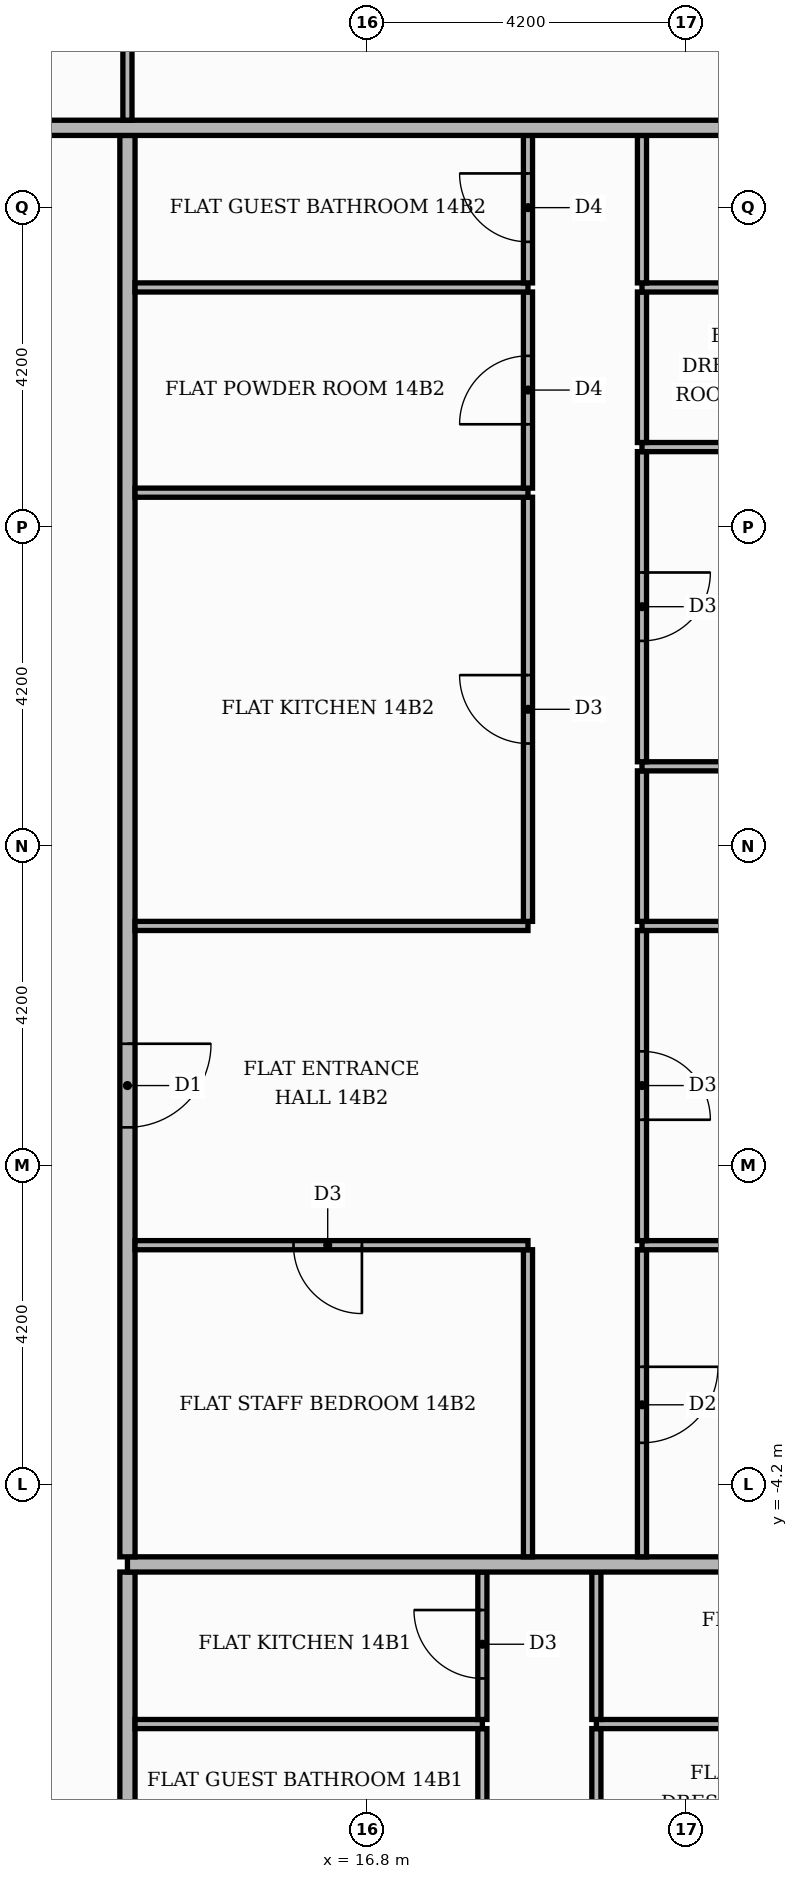
"""IFC4 building model, lengths in metres.
Left out: names, types, materials, properties, quantities, classifications, styles, units other than length and angle.
Written with IfcOpenShell. Run it as: python <this file> out.ifc"""

import sys

from ifc_helpers import new_model, si_unit, direction, frame, frame_2d, origin, place, context, subcontext, project, spatial, rectangle, extrude, element, fill, save


model = new_model("IFC4")
c1 = context("Model", 3, precision=1e-05, world=origin(), true_north=direction((0.0, 1.0)))
c2 = subcontext(c1, "Body", "Model", "MODEL_VIEW")
j1 = project(units=[si_unit("LENGTHUNIT", "METRE"), si_unit("PLANEANGLEUNIT", "RADIAN")], contexts=[c1])
p1 = place(None, origin())
s1 = spatial("IfcSite", under=j1, at=p1, CompositionType="ELEMENT")
p2 = place(p1, origin())
s2 = spatial("IfcBuilding", under=s1, at=p2, CompositionType="ELEMENT")
p3 = place(p2, frame((0.0, 0.0, 62.1)))
s3 = spatial("IfcBuildingStorey", under=s2, at=p3, CompositionType="ELEMENT", Elevation=62.1)
p4 = place(p3, frame((13.65, -13.55, 0.0), z_axis=(0.0, 0.0, 1.0), x_axis=(0.0, 1.0, 0.0)))
e1 = element("IfcWall", 1, at=p4, inside=s3, PredefinedType="PARTITIONING", context=c2, shape_type="SweptSolid", body=[
    extrude(rectangle(XDim=8.2, YDim=0.2, at=frame_2d((4.1, 0.0))), origin(), (0.0, 0.0, 1.0), 3.48),
])
p5 = place(p4, frame((1.45, 0.0, 0.0)))
e2 = element("IfcOpeningElement", 2, at=p5, cuts=e1, PredefinedType="OPENING", context=c2, shape_type="SweptSolid", body=[
    extrude(rectangle(XDim=1.1, YDim=2.4, at=frame_2d((0.55, 1.2))), frame((0.0, 0.11, 0.0), z_axis=(0.0, -1.0, 0.0), x_axis=(1.0, 0.0, 0.0)), (0.0, 0.0, 1.0), 0.22),
])
for number, where, z_axis, x_axis in (
    (3, (18.32, -9.39, 0.0), (0.0, 0.0, 1.0), (0.0, 1.0, 0.0)),
    (4, (19.82, -9.39, 0.0), (0.0, 0.0, 1.0), (0.0, 1.0, 0.0)),
):
    element("IfcWall", number, at=place(p3, frame(where, z_axis=z_axis, x_axis=x_axis)), inside=s3, PredefinedType="PARTITIONING", context=c2, shape_type="SweptSolid", body=[
        extrude(rectangle(XDim=1.98, YDim=0.12, at=frame_2d((0.99, 0.0))), origin(), (0.0, 0.0, 1.0), 3.48),
    ])
p6 = place(p3, frame((13.75, -7.35, 0.0), z_axis=(0.0, 0.0, 1.0), x_axis=(1.0, 0.0, 0.0)))
e5 = element("IfcWall", 5, at=p6, inside=s3, PredefinedType="PARTITIONING", context=c2, shape_type="SweptSolid", body=[
    extrude(rectangle(XDim=4.57, YDim=0.12, at=frame_2d((2.285, 0.0))), origin(), (0.0, 0.0, 1.0), 3.48),
])
p7 = place(p3, frame((19.82, -7.35, 0.0), z_axis=(0.0, 0.0, 1.0), x_axis=(1.0, 0.0, 0.0)))
e6 = element("IfcWall", 6, at=p7, inside=s3, PredefinedType="PARTITIONING", context=c2, shape_type="SweptSolid", body=[
    extrude(rectangle(XDim=5.6, YDim=0.12, at=frame_2d((2.8, 0.0))), origin(), (0.0, 0.0, 1.0), 3.48),
])
p8 = place(p7, frame((2.5, 0.0, 0.0)))
e7 = element("IfcOpeningElement", 7, at=p8, cuts=e6, PredefinedType="OPENING", context=c2, shape_type="SweptSolid", body=[
    extrude(rectangle(XDim=0.9, YDim=2.1, at=frame_2d((0.45, 1.05))), frame((0.0, 0.07, 0.0), z_axis=(0.0, -1.0, 0.0), x_axis=(1.0, 0.0, 0.0)), (0.0, 0.0, 1.0), 0.14),
])
p9 = place(p3, frame((18.32, -7.29, 0.0), z_axis=(0.0, 0.0, 1.0), x_axis=(0.0, 1.0, 0.0)))
e8 = element("IfcWall", 8, at=p9, inside=s3, PredefinedType="PARTITIONING", context=c2, shape_type="SweptSolid", body=[
    extrude(rectangle(XDim=1.94, YDim=0.12, at=frame_2d((0.97, 0.0))), origin(), (0.0, 0.0, 1.0), 3.48),
])
p10 = place(p9, frame((0.54, 0.0, 0.0)))
e9 = element("IfcOpeningElement", 9, at=p10, cuts=e8, PredefinedType="OPENING", context=c2, shape_type="SweptSolid", body=[
    extrude(rectangle(XDim=0.9, YDim=2.1, at=frame_2d((0.45, 1.05))), frame((0.0, 0.07, 0.0), z_axis=(0.0, -1.0, 0.0), x_axis=(1.0, 0.0, 0.0)), (0.0, 0.0, 1.0), 0.14),
])
p11 = place(p3, frame((19.82, -7.29, 0.0), z_axis=(0.0, 0.0, 1.0), x_axis=(0.0, 1.0, 0.0)))
e10 = element("IfcWall", 10, at=p11, inside=s3, PredefinedType="PARTITIONING", context=c2, shape_type="SweptSolid", body=[
    extrude(rectangle(XDim=1.94, YDim=0.12, at=frame_2d((0.97, 0.0))), origin(), (0.0, 0.0, 1.0), 3.48),
])
p12 = place(p3, frame((13.65, -5.25, 0.0), z_axis=(0.0, 0.0, 1.0), x_axis=(1.0, 0.0, 0.0)))
e11 = element("IfcWall", 11, at=p12, inside=s3, PredefinedType="PARTITIONING", context=c2, shape_type="SweptSolid", body=[
    extrude(rectangle(XDim=11.77, YDim=0.2, at=frame_2d((5.885, 0.0))), origin(), (0.0, 0.0, 1.0), 3.48),
])
p13 = place(p3, frame((13.65, -5.15, 0.0), z_axis=(0.0, 0.0, 1.0), x_axis=(0.0, 1.0, 0.0)))
e12 = element("IfcWall", 12, at=p13, inside=s3, PredefinedType="PARTITIONING", context=c2, shape_type="SweptSolid", body=[
    extrude(rectangle(XDim=18.7, YDim=0.2, at=frame_2d((9.35, 0.0))), origin(), (0.0, 0.0, 1.0), 3.48),
])
p14 = place(p13, frame((5.65, 0.0, 0.0)))
e13 = element("IfcOpeningElement", 13, at=p14, cuts=e12, PredefinedType="OPENING", context=c2, shape_type="SweptSolid", body=[
    extrude(rectangle(XDim=1.1, YDim=2.4, at=frame_2d((0.55, 1.2))), frame((0.0, 0.11, 0.0), z_axis=(0.0, -1.0, 0.0), x_axis=(1.0, 0.0, 0.0)), (0.0, 0.0, 1.0), 0.22),
])
p15 = place(p3, frame((18.92, -5.15, 0.0), z_axis=(0.0, 0.0, 1.0), x_axis=(0.0, 1.0, 0.0)))
e14 = element("IfcWall", 14, at=p15, inside=s3, PredefinedType="PARTITIONING", context=c2, shape_type="SweptSolid", body=[
    extrude(rectangle(XDim=4.04, YDim=0.12, at=frame_2d((2.02, 0.0))), origin(), (0.0, 0.0, 1.0), 3.48),
])
p16 = place(p3, frame((20.42, -5.15, 0.0), z_axis=(0.0, 0.0, 1.0), x_axis=(0.0, 1.0, 0.0)))
e15 = element("IfcWall", 15, at=p16, inside=s3, PredefinedType="PARTITIONING", context=c2, shape_type="SweptSolid", body=[
    extrude(rectangle(XDim=4.04, YDim=0.12, at=frame_2d((2.02, 0.0))), origin(), (0.0, 0.0, 1.0), 3.48),
])
p17 = place(p16, frame((1.5, 0.0, 0.0)))
e16 = element("IfcOpeningElement", 16, at=p17, cuts=e15, PredefinedType="OPENING", context=c2, shape_type="SweptSolid", body=[
    extrude(rectangle(XDim=1.0, YDim=2.1, at=frame_2d((0.5, 1.05))), frame((0.0, 0.07, 0.0), z_axis=(0.0, -1.0, 0.0), x_axis=(1.0, 0.0, 0.0)), (0.0, 0.0, 1.0), 0.14),
])
p18 = place(p3, frame((13.75, -1.05, 0.0), z_axis=(0.0, 0.0, 1.0), x_axis=(1.0, 0.0, 0.0)))
e17 = element("IfcWall", 17, at=p18, inside=s3, PredefinedType="PARTITIONING", context=c2, shape_type="SweptSolid", body=[
    extrude(rectangle(XDim=5.17, YDim=0.12, at=frame_2d((2.585, 0.0))), origin(), (0.0, 0.0, 1.0), 3.48),
])
p19 = place(p18, frame((2.085, 0.0, 0.0)))
e18 = element("IfcOpeningElement", 18, at=p19, cuts=e17, PredefinedType="OPENING", context=c2, shape_type="SweptSolid", body=[
    extrude(rectangle(XDim=0.9, YDim=2.1, at=frame_2d((0.45, 1.05))), frame((0.0, 0.07, 0.0), z_axis=(0.0, -1.0, 0.0), x_axis=(1.0, 0.0, 0.0)), (0.0, 0.0, 1.0), 0.14),
])
p20 = place(p3, frame((20.42, -1.05, 0.0), z_axis=(0.0, 0.0, 1.0), x_axis=(1.0, 0.0, 0.0)))
e19 = element("IfcWall", 19, at=p20, inside=s3, PredefinedType="PARTITIONING", context=c2, shape_type="SweptSolid", body=[
    extrude(rectangle(XDim=5.0, YDim=0.12, at=frame_2d((2.5, 0.0))), origin(), (0.0, 0.0, 1.0), 3.48),
])
p21 = place(p3, frame((20.42, -0.99, 0.0), z_axis=(0.0, 0.0, 1.0), x_axis=(0.0, 1.0, 0.0)))
e20 = element("IfcWall", 20, at=p21, inside=s3, PredefinedType="PARTITIONING", context=c2, shape_type="SweptSolid", body=[
    extrude(rectangle(XDim=4.08, YDim=0.12, at=frame_2d((2.04, 0.0))), origin(), (0.0, 0.0, 1.0), 3.48),
])
p22 = place(p21, frame((1.59, 0.0, 0.0)))
e21 = element("IfcOpeningElement", 21, at=p22, cuts=e20, PredefinedType="OPENING", context=c2, shape_type="SweptSolid", body=[
    extrude(rectangle(XDim=0.9, YDim=2.1, at=frame_2d((0.45, 1.05))), frame((0.0, 0.07, 0.0), z_axis=(0.0, -1.0, 0.0), x_axis=(1.0, 0.0, 0.0)), (0.0, 0.0, 1.0), 0.14),
])
p23 = place(p3, frame((13.75, 3.15, 0.0), z_axis=(0.0, 0.0, 1.0), x_axis=(1.0, 0.0, 0.0)))
e22 = element("IfcWall", 22, at=p23, inside=s3, PredefinedType="PARTITIONING", context=c2, shape_type="SweptSolid", body=[
    extrude(rectangle(XDim=5.17, YDim=0.12, at=frame_2d((2.585, 0.0))), origin(), (0.0, 0.0, 1.0), 3.48),
])
p24 = place(p3, frame((20.42, 3.15, 0.0), z_axis=(0.0, 0.0, 1.0), x_axis=(1.0, 0.0, 0.0)))
e23 = element("IfcWall", 23, at=p24, inside=s3, PredefinedType="PARTITIONING", context=c2, shape_type="SweptSolid", body=[
    extrude(rectangle(XDim=5.0, YDim=0.12, at=frame_2d((2.5, 0.0))), origin(), (0.0, 0.0, 1.0), 3.48),
])
p25 = place(p24, frame((2.2, 0.0, 0.0)))
e24 = element("IfcOpeningElement", 24, at=p25, cuts=e23, PredefinedType="OPENING", context=c2, shape_type="SweptSolid", body=[
    extrude(rectangle(XDim=0.9, YDim=2.1, at=frame_2d((0.45, 1.05))), frame((0.0, 0.07, 0.0), z_axis=(0.0, -1.0, 0.0), x_axis=(1.0, 0.0, 0.0)), (0.0, 0.0, 1.0), 0.14),
])
p26 = place(p3, frame((18.92, 3.21, 0.0), z_axis=(0.0, 0.0, 1.0), x_axis=(0.0, 1.0, 0.0)))
e25 = element("IfcWall", 25, at=p26, inside=s3, PredefinedType="PARTITIONING", context=c2, shape_type="SweptSolid", body=[
    extrude(rectangle(XDim=5.58, YDim=0.12, at=frame_2d((2.79, 0.0))), origin(), (0.0, 0.0, 1.0), 3.48),
])
p27 = place(p26, frame((2.34, 0.0, 0.0)))
e26 = element("IfcOpeningElement", 26, at=p27, cuts=e25, PredefinedType="OPENING", context=c2, shape_type="SweptSolid", body=[
    extrude(rectangle(XDim=0.9, YDim=2.1, at=frame_2d((0.45, 1.05))), frame((0.0, 0.07, 0.0), z_axis=(0.0, -1.0, 0.0), x_axis=(1.0, 0.0, 0.0)), (0.0, 0.0, 1.0), 0.14),
])
p28 = place(p3, frame((20.42, 3.21, 0.0), z_axis=(0.0, 0.0, 1.0), x_axis=(0.0, 1.0, 0.0)))
e27 = element("IfcWall", 27, at=p28, inside=s3, PredefinedType="PARTITIONING", context=c2, shape_type="SweptSolid", body=[
    extrude(rectangle(XDim=1.98, YDim=0.12, at=frame_2d((0.99, 0.0))), origin(), (0.0, 0.0, 1.0), 3.48),
])
p29 = place(p3, frame((20.42, 5.25, 0.0), z_axis=(0.0, 0.0, 1.0), x_axis=(1.0, 0.0, 0.0)))
e28 = element("IfcWall", 28, at=p29, inside=s3, PredefinedType="PARTITIONING", context=c2, shape_type="SweptSolid", body=[
    extrude(rectangle(XDim=5.0, YDim=0.12, at=frame_2d((2.5, 0.0))), origin(), (0.0, 0.0, 1.0), 3.48),
])
p30 = place(p3, frame((20.42, 5.31, 0.0), z_axis=(0.0, 0.0, 1.0), x_axis=(0.0, 1.0, 0.0)))
e29 = element("IfcWall", 29, at=p30, inside=s3, PredefinedType="PARTITIONING", context=c2, shape_type="SweptSolid", body=[
    extrude(rectangle(XDim=4.08, YDim=0.12, at=frame_2d((2.04, 0.0))), origin(), (0.0, 0.0, 1.0), 3.48),
])
p31 = place(p30, frame((1.59, 0.0, 0.0)))
e30 = element("IfcOpeningElement", 30, at=p31, cuts=e29, PredefinedType="OPENING", context=c2, shape_type="SweptSolid", body=[
    extrude(rectangle(XDim=0.9, YDim=2.1, at=frame_2d((0.45, 1.05))), frame((0.0, 0.07, 0.0), z_axis=(0.0, -1.0, 0.0), x_axis=(1.0, 0.0, 0.0)), (0.0, 0.0, 1.0), 0.14),
])
p32 = place(p3, frame((13.75, 8.85, 0.0), z_axis=(0.0, 0.0, 1.0), x_axis=(1.0, 0.0, 0.0)))
e31 = element("IfcWall", 31, at=p32, inside=s3, PredefinedType="PARTITIONING", context=c2, shape_type="SweptSolid", body=[
    extrude(rectangle(XDim=5.17, YDim=0.12, at=frame_2d((2.585, 0.0))), origin(), (0.0, 0.0, 1.0), 3.48),
])
p33 = place(p3, frame((18.92, 8.91, 0.0), z_axis=(0.0, 0.0, 1.0), x_axis=(0.0, 1.0, 0.0)))
e32 = element("IfcWall", 32, at=p33, inside=s3, PredefinedType="PARTITIONING", context=c2, shape_type="SweptSolid", body=[
    extrude(rectangle(XDim=2.58, YDim=0.12, at=frame_2d((1.29, 0.0))), origin(), (0.0, 0.0, 1.0), 3.48),
])
p34 = place(p33, frame((0.84, 0.0, 0.0)))
e33 = element("IfcOpeningElement", 33, at=p34, cuts=e32, PredefinedType="OPENING", context=c2, shape_type="SweptSolid", body=[
    extrude(rectangle(XDim=0.9, YDim=2.1, at=frame_2d((0.45, 1.05))), frame((0.0, 0.07, 0.0), z_axis=(0.0, -1.0, 0.0), x_axis=(1.0, 0.0, 0.0)), (0.0, 0.0, 1.0), 0.14),
])
p35 = place(p3, frame((20.42, 9.45, 0.0), z_axis=(0.0, 0.0, 1.0), x_axis=(1.0, 0.0, 0.0)))
e34 = element("IfcWall", 34, at=p35, inside=s3, PredefinedType="PARTITIONING", context=c2, shape_type="SweptSolid", body=[
    extrude(rectangle(XDim=5.0, YDim=0.12, at=frame_2d((2.5, 0.0))), origin(), (0.0, 0.0, 1.0), 3.48),
])
p36 = place(p35, frame((2.2, 0.0, 0.0)))
e35 = element("IfcOpeningElement", 35, at=p36, cuts=e34, PredefinedType="OPENING", context=c2, shape_type="SweptSolid", body=[
    extrude(rectangle(XDim=0.9, YDim=2.1, at=frame_2d((0.45, 1.05))), frame((0.0, 0.07, 0.0), z_axis=(0.0, -1.0, 0.0), x_axis=(1.0, 0.0, 0.0)), (0.0, 0.0, 1.0), 0.14),
])
p37 = place(p3, frame((20.42, 9.51, 0.0), z_axis=(0.0, 0.0, 1.0), x_axis=(0.0, 1.0, 0.0)))
e36 = element("IfcWall", 36, at=p37, inside=s3, PredefinedType="PARTITIONING", context=c2, shape_type="SweptSolid", body=[
    extrude(rectangle(XDim=1.98, YDim=0.12, at=frame_2d((0.99, 0.0))), origin(), (0.0, 0.0, 1.0), 3.48),
])
p38 = place(p3, frame((13.75, 11.55, 0.0), z_axis=(0.0, 0.0, 1.0), x_axis=(1.0, 0.0, 0.0)))
e37 = element("IfcWall", 37, at=p38, inside=s3, PredefinedType="PARTITIONING", context=c2, shape_type="SweptSolid", body=[
    extrude(rectangle(XDim=5.17, YDim=0.12, at=frame_2d((2.585, 0.0))), origin(), (0.0, 0.0, 1.0), 3.48),
])
p39 = place(p3, frame((20.42, 11.55, 0.0), z_axis=(0.0, 0.0, 1.0), x_axis=(1.0, 0.0, 0.0)))
e38 = element("IfcWall", 38, at=p39, inside=s3, PredefinedType="PARTITIONING", context=c2, shape_type="SweptSolid", body=[
    extrude(rectangle(XDim=5.0, YDim=0.12, at=frame_2d((2.5, 0.0))), origin(), (0.0, 0.0, 1.0), 3.48),
])
p40 = place(p39, frame((2.2, 0.0, 0.0)))
e39 = element("IfcOpeningElement", 39, at=p40, cuts=e38, PredefinedType="OPENING", context=c2, shape_type="SweptSolid", body=[
    extrude(rectangle(XDim=0.9, YDim=2.1, at=frame_2d((0.45, 1.05))), frame((0.0, 0.07, 0.0), z_axis=(0.0, -1.0, 0.0), x_axis=(1.0, 0.0, 0.0)), (0.0, 0.0, 1.0), 0.14),
])
p41 = place(p3, frame((18.92, 11.61, 0.0), z_axis=(0.0, 0.0, 1.0), x_axis=(0.0, 1.0, 0.0)))
e40 = element("IfcWall", 40, at=p41, inside=s3, PredefinedType="PARTITIONING", context=c2, shape_type="SweptSolid", body=[
    extrude(rectangle(XDim=1.94, YDim=0.12, at=frame_2d((0.97, 0.0))), origin(), (0.0, 0.0, 1.0), 3.48),
])
p42 = place(p41, frame((0.54, 0.0, 0.0)))
e41 = element("IfcOpeningElement", 41, at=p42, cuts=e40, PredefinedType="OPENING", context=c2, shape_type="SweptSolid", body=[
    extrude(rectangle(XDim=0.9, YDim=2.1, at=frame_2d((0.45, 1.05))), frame((0.0, 0.07, 0.0), z_axis=(0.0, -1.0, 0.0), x_axis=(1.0, 0.0, 0.0)), (0.0, 0.0, 1.0), 0.14),
])
p43 = place(p3, frame((20.42, 11.61, 0.0), z_axis=(0.0, 0.0, 1.0), x_axis=(0.0, 1.0, 0.0)))
e42 = element("IfcWall", 42, at=p43, inside=s3, PredefinedType="PARTITIONING", context=c2, shape_type="SweptSolid", body=[
    extrude(rectangle(XDim=1.94, YDim=0.12, at=frame_2d((0.97, 0.0))), origin(), (0.0, 0.0, 1.0), 3.48),
])
p44 = place(p3, frame((-13.65, 13.65, 0.0), z_axis=(0.0, 0.0, 1.0), x_axis=(1.0, 0.0, 0.0)))
e43 = element("IfcWall", 43, at=p44, inside=s3, PredefinedType="PARTITIONING", context=c2, shape_type="SweptSolid", body=[
    extrude(rectangle(XDim=39.07, YDim=0.2, at=frame_2d((19.535, 0.0))), origin(), (0.0, 0.0, 1.0), 3.48),
])
p45 = place(p44, frame((23.6, 0.0, 0.0)))
e44 = element("IfcOpeningElement", 44, at=p45, cuts=e43, PredefinedType="OPENING", context=c2, shape_type="SweptSolid", body=[
    extrude(rectangle(XDim=1.1, YDim=2.4, at=frame_2d((0.55, 1.2))), frame((0.0, 0.11, 0.0), z_axis=(0.0, -1.0, 0.0), x_axis=(1.0, 0.0, 0.0)), (0.0, 0.0, 1.0), 0.22),
])
p46 = place(p3, frame((13.65, 13.75, 0.0), z_axis=(0.0, 0.0, 1.0), x_axis=(0.0, 1.0, 0.0)))
e45 = element("IfcWall", 45, at=p46, inside=s3, PredefinedType="PARTITIONING", context=c2, shape_type="SweptSolid", body=[
    extrude(rectangle(XDim=6.91, YDim=0.12, at=frame_2d((3.455, 0.0))), origin(), (0.0, 0.0, 1.0), 3.48),
])
p47 = place(p46, frame((2.935, 0.0, 0.0)))
e46 = element("IfcOpeningElement", 46, at=p47, cuts=e45, PredefinedType="OPENING", context=c2, shape_type="SweptSolid", body=[
    extrude(rectangle(XDim=1.0, YDim=2.1, at=frame_2d((0.5, 1.05))), frame((0.0, 0.07, 0.0), z_axis=(0.0, -1.0, 0.0), x_axis=(1.0, 0.0, 0.0)), (0.0, 0.0, 1.0), 0.14),
])
p48 = place(p10, origin())
e47 = element("IfcDoor", 47, at=p48, inside=s3, OperationType="SINGLE_SWING_RIGHT", PredefinedType="DOOR", context=c2, shape_type="SweptSolid", body=[
    extrude(rectangle(XDim=0.9, YDim=2.1, at=frame_2d((0.45, 1.05))), frame((0.0, 0.025, 0.0), z_axis=(0.0, -1.0, 0.0), x_axis=(1.0, 0.0, 0.0)), (0.0, 0.0, 1.0), 0.05),
])
fill(e9, e47)
p49 = place(p14, frame((1.1, 0.0, 0.0), z_axis=(0.0, 0.0, 1.0), x_axis=(-1.0, 0.0, 0.0)))
e48 = element("IfcDoor", 48, at=p49, inside=s3, OperationType="SINGLE_SWING_RIGHT", PredefinedType="DOOR", context=c2, shape_type="SweptSolid", body=[
    extrude(rectangle(XDim=1.1, YDim=2.4, at=frame_2d((0.55, 1.2))), frame((0.0, 0.025, 0.0), z_axis=(0.0, -1.0, 0.0), x_axis=(1.0, 0.0, 0.0)), (0.0, 0.0, 1.0), 0.05),
])
fill(e13, e48)
p50 = place(p19, frame((0.9, 0.0, 0.0), z_axis=(0.0, 0.0, 1.0), x_axis=(-1.0, 0.0, 0.0)))
e49 = element("IfcDoor", 49, at=p50, inside=s3, OperationType="SINGLE_SWING_RIGHT", PredefinedType="DOOR", context=c2, shape_type="SweptSolid", body=[
    extrude(rectangle(XDim=0.9, YDim=2.1, at=frame_2d((0.45, 1.05))), frame((0.0, 0.025, 0.0), z_axis=(0.0, -1.0, 0.0), x_axis=(1.0, 0.0, 0.0)), (0.0, 0.0, 1.0), 0.05),
])
fill(e18, e49)
p51 = place(p27, origin())
e50 = element("IfcDoor", 50, at=p51, inside=s3, OperationType="SINGLE_SWING_RIGHT", PredefinedType="DOOR", context=c2, shape_type="SweptSolid", body=[
    extrude(rectangle(XDim=0.9, YDim=2.1, at=frame_2d((0.45, 1.05))), frame((0.0, 0.025, 0.0), z_axis=(0.0, -1.0, 0.0), x_axis=(1.0, 0.0, 0.0)), (0.0, 0.0, 1.0), 0.05),
])
fill(e26, e50)
p52 = place(p34, origin())
e51 = element("IfcDoor", 51, at=p52, inside=s3, OperationType="SINGLE_SWING_LEFT", PredefinedType="DOOR", context=c2, shape_type="SweptSolid", body=[
    extrude(rectangle(XDim=0.9, YDim=2.1, at=frame_2d((0.45, 1.05))), frame((0.0, 0.025, 0.0), z_axis=(0.0, -1.0, 0.0), x_axis=(1.0, 0.0, 0.0)), (0.0, 0.0, 1.0), 0.05),
])
fill(e33, e51)
p53 = place(p42, origin())
e52 = element("IfcDoor", 52, at=p53, inside=s3, OperationType="SINGLE_SWING_RIGHT", PredefinedType="DOOR", context=c2, shape_type="SweptSolid", body=[
    extrude(rectangle(XDim=0.9, YDim=2.1, at=frame_2d((0.45, 1.05))), frame((0.0, 0.025, 0.0), z_axis=(0.0, -1.0, 0.0), x_axis=(1.0, 0.0, 0.0)), (0.0, 0.0, 1.0), 0.05),
])
fill(e41, e52)
p54 = place(p17, frame((1.0, 0.0, 0.0), z_axis=(0.0, 0.0, 1.0), x_axis=(-1.0, 0.0, 0.0)))
e53 = element("IfcDoor", 53, at=p54, inside=s3, OperationType="SINGLE_SWING_RIGHT", PredefinedType="DOOR", context=c2, shape_type="SweptSolid", body=[
    extrude(rectangle(XDim=1.0, YDim=2.1, at=frame_2d((0.5, 1.05))), frame((0.0, 0.025, 0.0), z_axis=(0.0, -1.0, 0.0), x_axis=(1.0, 0.0, 0.0)), (0.0, 0.0, 1.0), 0.05),
])
fill(e16, e53)
p55 = place(p22, frame((0.9, 0.0, 0.0), z_axis=(0.0, 0.0, 1.0), x_axis=(-1.0, 0.0, 0.0)))
e54 = element("IfcDoor", 54, at=p55, inside=s3, OperationType="SINGLE_SWING_LEFT", PredefinedType="DOOR", context=c2, shape_type="SweptSolid", body=[
    extrude(rectangle(XDim=0.9, YDim=2.1, at=frame_2d((0.45, 1.05))), frame((0.0, 0.025, 0.0), z_axis=(0.0, -1.0, 0.0), x_axis=(1.0, 0.0, 0.0)), (0.0, 0.0, 1.0), 0.05),
])
fill(e21, e54)
p56 = place(p31, frame((0.9, 0.0, 0.0), z_axis=(0.0, 0.0, 1.0), x_axis=(-1.0, 0.0, 0.0)))
e55 = element("IfcDoor", 55, at=p56, inside=s3, OperationType="SINGLE_SWING_RIGHT", PredefinedType="DOOR", context=c2, shape_type="SweptSolid", body=[
    extrude(rectangle(XDim=0.9, YDim=2.1, at=frame_2d((0.45, 1.05))), frame((0.0, 0.025, 0.0), z_axis=(0.0, -1.0, 0.0), x_axis=(1.0, 0.0, 0.0)), (0.0, 0.0, 1.0), 0.05),
])
fill(e30, e55)
save(model, sys.argv[1])
